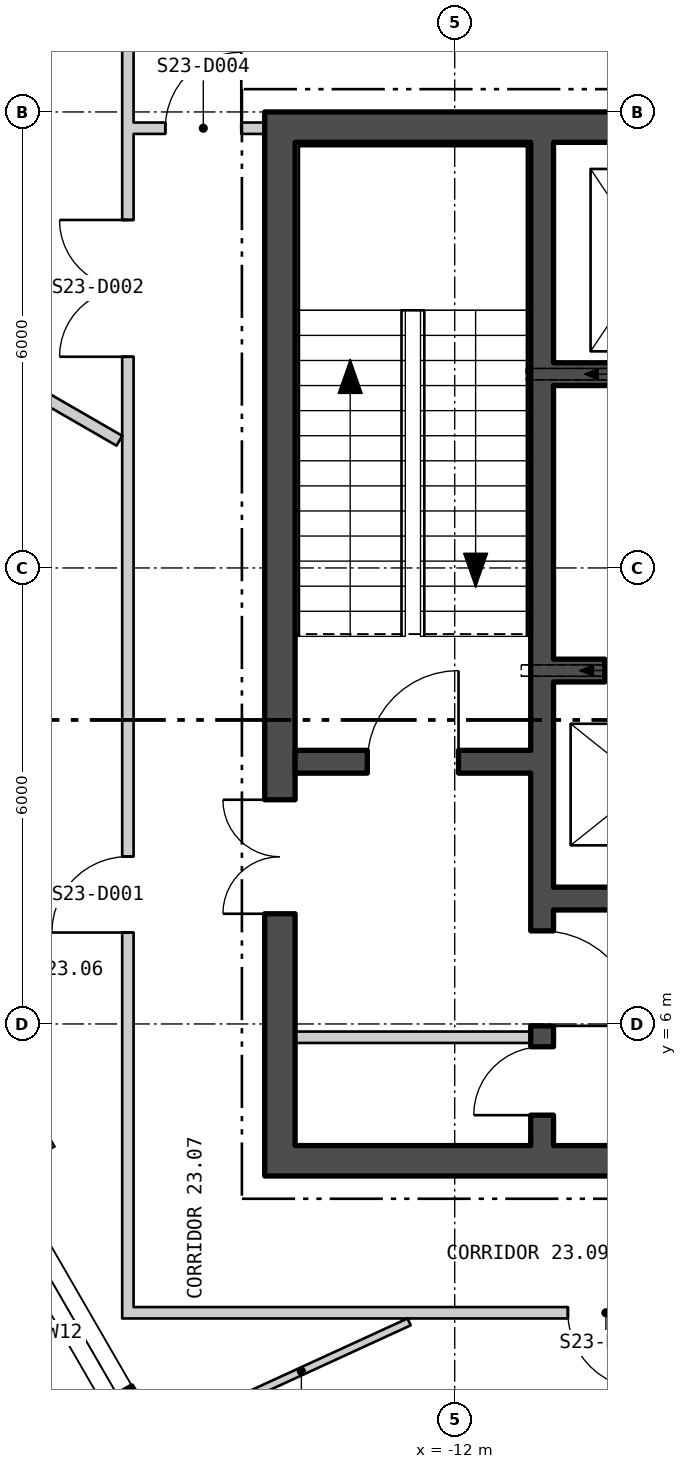
"""IFC4 building model, lengths in metres.
Left out: names, types, materials, properties, quantities, classifications, styles, units other than length and angle.
Written with IfcOpenShell. Run it as: python <this file> out.ifc"""

import sys

from ifc_helpers import new_model, si_unit, direction, frame, frame_2d, origin, origin_2d, place, context, subcontext, project, spatial, polyline, rectangle, hollow_rectangle, outline, extrude, element, fill, save


model = new_model("IFC4")
c1 = context("Model", 3, precision=1e-05, world=origin(), true_north=direction((0.0, 1.0)))
c2 = subcontext(c1, "Body", "Model", "MODEL_VIEW")
j1 = project(units=[si_unit("LENGTHUNIT", "METRE"), si_unit("PLANEANGLEUNIT", "RADIAN")], contexts=[c1])
p1 = place(None, origin())
s1 = spatial("IfcSite", under=j1, at=p1, CompositionType="ELEMENT")
p2 = place(p1, origin())
s2 = spatial("IfcBuilding", under=s1, at=p2, CompositionType="ELEMENT")
p3 = place(p2, frame((0.0, 0.0, 304.2)))
s3 = spatial("IfcBuildingStorey", under=s2, at=p3, CompositionType="ELEMENT", Elevation=304.2)
p4 = place(p3, frame((-17.671, 4.404, 0.0), z_axis=(0.0, 0.0, 1.0), x_axis=(0.5, -0.866025403784, 0.0)))
e1 = element("IfcColumn", 1, at=p4, inside=s3, PredefinedType="COLUMN", context=c2, shape_type="SweptSolid", body=[
    extrude(hollow_rectangle(XDim=0.45, YDim=0.7, WallThickness=0.04, at=origin_2d()), origin(), (0.0, 0.0, 1.0), 4.2),
])
p5 = place(p3, frame((-25.095, 16.112, -0.18), z_axis=(0.0, 0.0, 1.0), x_axis=(0.500000141277, -0.866025322218, 0.0)))
e2 = element("IfcWall", 2, at=p5, inside=s3, PredefinedType="SOLIDWALL", context=c2, shape_type="SweptSolid", body=[
    extrude(outline(polyline([(-0.13, -0.225), (45.86, -0.225), (45.6, 0.225), (0.13, 0.225), (-0.13, -0.225)])), origin(), (0.0, 0.0, 1.0), 3.98),
])
p6 = place(p5, frame((1.424, 0.0, 1.08)))
e3 = element("IfcOpeningElement", 3, at=p6, cuts=e2, PredefinedType="OPENING", context=c2, shape_type="SweptSolid", body=[
    extrude(rectangle(XDim=2.4, YDim=2.3, at=frame_2d((1.2, 1.15))), frame((0.0, 0.235, 0.0), z_axis=(0.0, -1.0, 0.0), x_axis=(1.0, 0.0, 0.0)), (0.0, 0.0, 1.0), 0.47),
])
p7 = place(p5, frame((5.892, 0.0, 1.08)))
e4 = element("IfcOpeningElement", 4, at=p7, cuts=e2, PredefinedType="OPENING", context=c2, shape_type="SweptSolid", body=[
    extrude(rectangle(XDim=2.4, YDim=2.3, at=frame_2d((1.2, 1.15))), frame((0.0, 0.235, 0.0), z_axis=(0.0, -1.0, 0.0), x_axis=(1.0, 0.0, 0.0)), (0.0, 0.0, 1.0), 0.47),
])
p8 = place(p5, frame((10.399, 0.0, 1.08)))
e5 = element("IfcOpeningElement", 5, at=p8, cuts=e2, PredefinedType="OPENING", context=c2, shape_type="SweptSolid", body=[
    extrude(rectangle(XDim=2.4, YDim=2.3, at=frame_2d((1.2, 1.15))), frame((0.0, 0.235, 0.0), z_axis=(0.0, -1.0, 0.0), x_axis=(1.0, 0.0, 0.0)), (0.0, 0.0, 1.0), 0.47),
])
p9 = place(p5, frame((14.905, 0.0, 1.08)))
e6 = element("IfcOpeningElement", 6, at=p9, cuts=e2, PredefinedType="OPENING", context=c2, shape_type="SweptSolid", body=[
    extrude(rectangle(XDim=2.4, YDim=2.3, at=frame_2d((1.2, 1.15))), frame((0.0, 0.235, 0.0), z_axis=(0.0, -1.0, 0.0), x_axis=(1.0, 0.0, 0.0)), (0.0, 0.0, 1.0), 0.47),
])
p10 = place(p5, frame((19.412, 0.0, 1.08)))
e7 = element("IfcOpeningElement", 7, at=p10, cuts=e2, PredefinedType="OPENING", context=c2, shape_type="SweptSolid", body=[
    extrude(rectangle(XDim=2.4, YDim=2.3, at=frame_2d((1.2, 1.15))), frame((0.0, 0.235, 0.0), z_axis=(0.0, -1.0, 0.0), x_axis=(1.0, 0.0, 0.0)), (0.0, 0.0, 1.0), 0.47),
])
p11 = place(p5, frame((28.425, 0.0, 1.08)))
e8 = element("IfcOpeningElement", 8, at=p11, cuts=e2, PredefinedType="OPENING", context=c2, shape_type="SweptSolid", body=[
    extrude(rectangle(XDim=2.4, YDim=2.3, at=frame_2d((1.2, 1.15))), frame((0.0, 0.235, 0.0), z_axis=(0.0, -1.0, 0.0), x_axis=(1.0, 0.0, 0.0)), (0.0, 0.0, 1.0), 0.47),
])
p12 = place(p5, frame((32.932, 0.0, 1.08)))
e9 = element("IfcOpeningElement", 9, at=p12, cuts=e2, PredefinedType="OPENING", context=c2, shape_type="SweptSolid", body=[
    extrude(rectangle(XDim=2.4, YDim=2.3, at=frame_2d((1.2, 1.15))), frame((0.0, 0.235, 0.0), z_axis=(0.0, -1.0, 0.0), x_axis=(1.0, 0.0, 0.0)), (0.0, 0.0, 1.0), 0.47),
])
p13 = place(p5, frame((37.438, 0.0, 1.08)))
e10 = element("IfcOpeningElement", 10, at=p13, cuts=e2, PredefinedType="OPENING", context=c2, shape_type="SweptSolid", body=[
    extrude(rectangle(XDim=2.4, YDim=2.3, at=frame_2d((1.2, 1.15))), frame((0.0, 0.235, 0.0), z_axis=(0.0, -1.0, 0.0), x_axis=(1.0, 0.0, 0.0)), (0.0, 0.0, 1.0), 0.47),
])
p14 = place(p5, frame((41.907, 0.0, 1.08)))
e11 = element("IfcOpeningElement", 11, at=p14, cuts=e2, PredefinedType="OPENING", context=c2, shape_type="SweptSolid", body=[
    extrude(rectangle(XDim=2.4, YDim=2.3, at=frame_2d((1.2, 1.15))), frame((0.0, 0.235, 0.0), z_axis=(0.0, -1.0, 0.0), x_axis=(1.0, 0.0, 0.0)), (0.0, 0.0, 1.0), 0.47),
])
p15 = place(p3, frame((-14.5, 4.2, 0.0), z_axis=(0.0, 0.0, 1.0), x_axis=(1.0, 0.0, 0.0)))
e12 = element("IfcWall", 12, at=p15, inside=s3, PredefinedType="SHEAR", context=c2, shape_type="SweptSolid", body=[
    extrude(rectangle(XDim=29.0, YDim=0.4, at=frame_2d((14.5, 0.0))), origin(), (0.0, 0.0, 1.0), 4.0),
])
p16 = place(p15, frame((9.0, 0.0, 0.0)))
e13 = element("IfcOpeningElement", 13, at=p16, cuts=e12, PredefinedType="OPENING", context=c2, shape_type="SweptSolid", body=[
    extrude(rectangle(XDim=1.8, YDim=2.4, at=frame_2d((0.9, 1.2))), frame((0.0, 0.21, 0.0), z_axis=(0.0, -1.0, 0.0), x_axis=(1.0, 0.0, 0.0)), (0.0, 0.0, 1.0), 0.42),
])
p17 = place(p15, frame((19.0, 0.0, 0.0)))
e14 = element("IfcOpeningElement", 14, at=p17, cuts=e12, PredefinedType="OPENING", context=c2, shape_type="SweptSolid", body=[
    extrude(rectangle(XDim=1.8, YDim=2.4, at=frame_2d((0.9, 1.2))), frame((0.0, 0.21, 0.0), z_axis=(0.0, -1.0, 0.0), x_axis=(1.0, 0.0, 0.0)), (0.0, 0.0, 1.0), 0.42),
])
p18 = place(p3, frame((-14.5, 17.8, 0.0), z_axis=(0.0, 0.0, 1.0), x_axis=(1.0, 0.0, 0.0)))
e15 = element("IfcWall", 15, at=p18, inside=s3, PredefinedType="SHEAR", context=c2, shape_type="SweptSolid", body=[
    extrude(rectangle(XDim=29.0, YDim=0.4, at=frame_2d((14.5, 0.0))), origin(), (0.0, 0.0, 1.0), 4.0),
])
p19 = place(p3, frame((-14.3, 4.4, 0.0), z_axis=(0.0, 0.0, 1.0), x_axis=(0.0, 1.0, 0.0)))
e16 = element("IfcWall", 16, at=p19, inside=s3, PredefinedType="SHEAR", context=c2, shape_type="SweptSolid", body=[
    extrude(rectangle(XDim=13.2, YDim=0.4, at=frame_2d((6.6, 0.0))), origin(), (0.0, 0.0, 1.0), 4.0),
])
p20 = place(p19, frame((3.05, 0.0, 0.0)))
e17 = element("IfcOpeningElement", 17, at=p20, cuts=e16, PredefinedType="OPENING", context=c2, shape_type="SweptSolid", body=[
    extrude(rectangle(XDim=1.5, YDim=2.1, at=frame_2d((0.75, 1.05))), frame((0.0, 0.21, 0.0), z_axis=(0.0, -1.0, 0.0), x_axis=(1.0, 0.0, 0.0)), (0.0, 0.0, 1.0), 0.42),
])
p21 = place(p3, frame((-10.85, 4.4, 0.0), z_axis=(0.0, 0.0, 1.0), x_axis=(0.0, 1.0, 0.0)))
e18 = element("IfcWall", 18, at=p21, inside=s3, PredefinedType="SHEAR", context=c2, shape_type="SweptSolid", body=[
    extrude(rectangle(XDim=13.2, YDim=0.3, at=frame_2d((6.6, 0.0))), origin(), (0.0, 0.0, 1.0), 4.0),
])
p22 = place(p21, frame((1.575, 0.0, 0.0)))
e19 = element("IfcOpeningElement", 19, at=p22, cuts=e18, PredefinedType="OPENING", context=c2, shape_type="SweptSolid", body=[
    extrude(rectangle(XDim=1.25, YDim=2.1, at=frame_2d((0.625, 1.05))), frame((0.0, 0.16, 0.0), z_axis=(0.0, -1.0, 0.0), x_axis=(1.0, 0.0, 0.0)), (0.0, 0.0, 1.0), 0.32),
])
p23 = place(p21, frame((0.4, 0.0, 0.0)))
e20 = element("IfcOpeningElement", 20, at=p23, cuts=e18, PredefinedType="OPENING", context=c2, shape_type="SweptSolid", body=[
    extrude(rectangle(XDim=0.9, YDim=2.1, at=frame_2d((0.45, 1.05))), frame((0.0, 0.16, 0.0), z_axis=(0.0, -1.0, 0.0), x_axis=(1.0, 0.0, 0.0)), (0.0, 0.0, 1.0), 0.32),
])
p24 = place(p3, frame((-14.1, 9.45, 0.0), z_axis=(0.0, 0.0, 1.0), x_axis=(1.0, 0.0, 0.0)))
e21 = element("IfcWall", 21, at=p24, inside=s3, PredefinedType="SHEAR", context=c2, shape_type="SweptSolid", body=[
    extrude(rectangle(XDim=3.1, YDim=0.3, at=frame_2d((1.55, 0.0))), origin(), (0.0, 0.0, 1.0), 4.0),
])
p25 = place(p24, frame((0.95, 0.0, 0.0)))
e22 = element("IfcOpeningElement", 22, at=p25, cuts=e21, PredefinedType="OPENING", context=c2, shape_type="SweptSolid", body=[
    extrude(rectangle(XDim=1.2, YDim=2.1, at=frame_2d((0.6, 1.05))), frame((0.0, 0.16, 0.0), z_axis=(0.0, -1.0, 0.0), x_axis=(1.0, 0.0, 0.0)), (0.0, 0.0, 1.0), 0.32),
])
p26 = place(p3, frame((-10.7, 14.55, 0.0), z_axis=(0.0, 0.0, 1.0), x_axis=(1.0, 0.0, 0.0)))
e23 = element("IfcWall", 23, at=p26, inside=s3, PredefinedType="SHEAR", context=c2, shape_type="SweptSolid", body=[
    extrude(rectangle(XDim=21.4, YDim=0.3, at=frame_2d((10.7, 0.0))), origin(), (0.0, 0.0, 1.0), 4.0),
])
p27 = place(p26, frame((0.738, 0.0, 0.0)))
e24 = element("IfcOpeningElement", 24, at=p27, cuts=e23, PredefinedType="OPENING", context=c2, shape_type="SweptSolid", body=[
    extrude(rectangle(XDim=1.1, YDim=2.1, at=frame_2d((0.55, 1.05))), frame((0.0, 0.16, 0.0), z_axis=(0.0, -1.0, 0.0), x_axis=(1.0, 0.0, 0.0)), (0.0, 0.0, 1.0), 0.32),
])
p28 = place(p26, frame((3.462, 0.0, 0.0)))
e25 = element("IfcOpeningElement", 25, at=p28, cuts=e23, PredefinedType="OPENING", context=c2, shape_type="SweptSolid", body=[
    extrude(rectangle(XDim=1.1, YDim=2.1, at=frame_2d((0.55, 1.05))), frame((0.0, 0.16, 0.0), z_axis=(0.0, -1.0, 0.0), x_axis=(1.0, 0.0, 0.0)), (0.0, 0.0, 1.0), 0.32),
])
p29 = place(p26, frame((6.138, 0.0, 0.0)))
e26 = element("IfcOpeningElement", 26, at=p29, cuts=e23, PredefinedType="OPENING", context=c2, shape_type="SweptSolid", body=[
    extrude(rectangle(XDim=1.1, YDim=2.1, at=frame_2d((0.55, 1.05))), frame((0.0, 0.16, 0.0), z_axis=(0.0, -1.0, 0.0), x_axis=(1.0, 0.0, 0.0)), (0.0, 0.0, 1.0), 0.32),
])
p30 = place(p26, frame((8.812, 0.0, 0.0)))
e27 = element("IfcOpeningElement", 27, at=p30, cuts=e23, PredefinedType="OPENING", context=c2, shape_type="SweptSolid", body=[
    extrude(rectangle(XDim=1.1, YDim=2.1, at=frame_2d((0.55, 1.05))), frame((0.0, 0.16, 0.0), z_axis=(0.0, -1.0, 0.0), x_axis=(1.0, 0.0, 0.0)), (0.0, 0.0, 1.0), 0.32),
])
p31 = place(p26, frame((19.562, 0.0, 0.0)))
e28 = element("IfcOpeningElement", 28, at=p31, cuts=e23, PredefinedType="OPENING", context=c2, shape_type="SweptSolid", body=[
    extrude(rectangle(XDim=1.1, YDim=2.1, at=frame_2d((0.55, 1.05))), frame((0.0, 0.16, 0.0), z_axis=(0.0, -1.0, 0.0), x_axis=(1.0, 0.0, 0.0)), (0.0, 0.0, 1.0), 0.32),
])
p32 = place(p26, frame((11.537, 0.0, 0.0)))
e29 = element("IfcOpeningElement", 29, at=p32, cuts=e23, PredefinedType="OPENING", context=c2, shape_type="SweptSolid", body=[
    extrude(rectangle(XDim=1.0, YDim=2.1, at=frame_2d((0.5, 1.05))), frame((0.0, 0.16, 0.0), z_axis=(0.0, -1.0, 0.0), x_axis=(1.0, 0.0, 0.0)), (0.0, 0.0, 1.0), 0.32),
])
p33 = place(p26, frame((14.213, 0.0, 0.0)))
e30 = element("IfcOpeningElement", 30, at=p33, cuts=e23, PredefinedType="OPENING", context=c2, shape_type="SweptSolid", body=[
    extrude(rectangle(XDim=1.0, YDim=2.1, at=frame_2d((0.5, 1.05))), frame((0.0, 0.16, 0.0), z_axis=(0.0, -1.0, 0.0), x_axis=(1.0, 0.0, 0.0)), (0.0, 0.0, 1.0), 0.32),
])
p34 = place(p26, frame((16.887, 0.0, 0.0)))
e31 = element("IfcOpeningElement", 31, at=p34, cuts=e23, PredefinedType="OPENING", context=c2, shape_type="SweptSolid", body=[
    extrude(rectangle(XDim=1.0, YDim=2.1, at=frame_2d((0.5, 1.05))), frame((0.0, 0.16, 0.0), z_axis=(0.0, -1.0, 0.0), x_axis=(1.0, 0.0, 0.0)), (0.0, 0.0, 1.0), 0.32),
])
p35 = place(p3, frame((-10.7, 10.65, 0.0), z_axis=(0.0, 0.0, 1.0), x_axis=(1.0, 0.0, 0.0)))
e32 = element("IfcWall", 32, at=p35, inside=s3, PredefinedType="SHEAR", context=c2, shape_type="SweptSolid", body=[
    extrude(rectangle(XDim=10.3, YDim=0.3, at=frame_2d((5.15, 0.0))), origin(), (0.0, 0.0, 1.0), 4.0),
])
p36 = place(p35, frame((0.675, 0.0, 0.0)))
e33 = element("IfcOpeningElement", 33, at=p36, cuts=e32, PredefinedType="OPENING", context=c2, shape_type="SweptSolid", body=[
    extrude(rectangle(XDim=1.1, YDim=2.1, at=frame_2d((0.55, 1.05))), frame((0.0, 0.16, 0.0), z_axis=(0.0, -1.0, 0.0), x_axis=(1.0, 0.0, 0.0)), (0.0, 0.0, 1.0), 0.32),
])
p37 = place(p35, frame((3.275, 0.0, 0.0)))
e34 = element("IfcOpeningElement", 34, at=p37, cuts=e32, PredefinedType="OPENING", context=c2, shape_type="SweptSolid", body=[
    extrude(rectangle(XDim=1.1, YDim=2.1, at=frame_2d((0.55, 1.05))), frame((0.0, 0.16, 0.0), z_axis=(0.0, -1.0, 0.0), x_axis=(1.0, 0.0, 0.0)), (0.0, 0.0, 1.0), 0.32),
])
p38 = place(p35, frame((5.825, 0.0, 0.0)))
e35 = element("IfcOpeningElement", 35, at=p38, cuts=e32, PredefinedType="OPENING", context=c2, shape_type="SweptSolid", body=[
    extrude(rectangle(XDim=1.1, YDim=2.1, at=frame_2d((0.55, 1.05))), frame((0.0, 0.16, 0.0), z_axis=(0.0, -1.0, 0.0), x_axis=(1.0, 0.0, 0.0)), (0.0, 0.0, 1.0), 0.32),
])
p39 = place(p35, frame((8.425, 0.0, 0.0)))
e36 = element("IfcOpeningElement", 36, at=p39, cuts=e32, PredefinedType="OPENING", context=c2, shape_type="SweptSolid", body=[
    extrude(rectangle(XDim=1.0, YDim=2.1, at=frame_2d((0.5, 1.05))), frame((0.0, 0.16, 0.0), z_axis=(0.0, -1.0, 0.0), x_axis=(1.0, 0.0, 0.0)), (0.0, 0.0, 1.0), 0.32),
])
p40 = place(p3, frame((-10.7, 7.65, 0.0), z_axis=(0.0, 0.0, 1.0), x_axis=(1.0, 0.0, 0.0)))
e37 = element("IfcWall", 37, at=p40, inside=s3, PredefinedType="SHEAR", context=c2, shape_type="SweptSolid", body=[
    extrude(rectangle(XDim=10.3, YDim=0.3, at=frame_2d((5.15, 0.0))), origin(), (0.0, 0.0, 1.0), 4.0),
])
p41 = place(p3, frame((-14.1, 5.825, 0.0), z_axis=(0.0, 0.0, 1.0), x_axis=(1.0, 0.0, 0.0)))
e38 = element("IfcWall", 38, at=p41, inside=s3, PredefinedType="PARTITIONING", context=c2, shape_type="SweptSolid", body=[
    extrude(rectangle(XDim=3.1, YDim=0.15, at=frame_2d((1.55, 0.0))), origin(), (0.0, 0.0, 1.0), 4.0),
])
p42 = place(p3, frame((-17.938, 14.555, 0.0), z_axis=(0.0, 0.0, 1.0), x_axis=(0.866034375916, -0.49998445949, 0.0)))
e39 = element("IfcWall", 39, at=p42, inside=s3, PredefinedType="PARTITIONING", context=c2, shape_type="SweptSolid", body=[
    extrude(rectangle(XDim=1.762, YDim=0.15, at=frame_2d((0.881, 0.0))), origin(), (0.0, 0.0, 1.0), 4.0),
])
p43 = place(p3, frame((-16.3, 2.125, 0.0), z_axis=(0.0, 0.0, 1.0), x_axis=(0.0, 1.0, 0.0)))
e40 = element("IfcWall", 40, at=p43, inside=s3, PredefinedType="PARTITIONING", context=c2, shape_type="SweptSolid", body=[
    extrude(rectangle(XDim=17.623, YDim=0.15, at=frame_2d((8.812, 0.0))), origin(), (0.0, 0.0, 1.0), 4.0),
])
p44 = place(p43, frame((5.078, 0.0, 0.0)))
e41 = element("IfcOpeningElement", 41, at=p44, cuts=e40, PredefinedType="OPENING", context=c2, shape_type="SweptSolid", body=[
    extrude(rectangle(XDim=1.0, YDim=2.1, at=frame_2d((0.5, 1.05))), frame((0.0, 0.085, 0.0), z_axis=(0.0, -1.0, 0.0), x_axis=(1.0, 0.0, 0.0)), (0.0, 0.0, 1.0), 0.17),
])
p45 = place(p43, frame((12.654, 0.0, 0.0)))
e42 = element("IfcOpeningElement", 42, at=p45, cuts=e40, PredefinedType="OPENING", context=c2, shape_type="SweptSolid", body=[
    extrude(rectangle(XDim=1.8, YDim=2.1, at=frame_2d((0.9, 1.05))), frame((0.0, 0.085, 0.0), z_axis=(0.0, -1.0, 0.0), x_axis=(1.0, 0.0, 0.0)), (0.0, 0.0, 1.0), 0.17),
])
p46 = place(p3, frame((-16.225, 2.2, 0.0), z_axis=(0.0, 0.0, 1.0), x_axis=(1.0, 0.0, 0.0)))
e43 = element("IfcWall", 43, at=p46, inside=s3, PredefinedType="PARTITIONING", context=c2, shape_type="SweptSolid", body=[
    extrude(rectangle(XDim=8.645, YDim=0.15, at=frame_2d((4.322, 0.0))), origin(), (0.0, 0.0, 1.0), 4.0),
])
p47 = place(p46, frame((5.714, 0.0, 0.0)))
e44 = element("IfcOpeningElement", 44, at=p47, cuts=e43, PredefinedType="OPENING", context=c2, shape_type="SweptSolid", body=[
    extrude(rectangle(XDim=1.0, YDim=2.1, at=frame_2d((0.5, 1.05))), frame((0.0, 0.085, 0.0), z_axis=(0.0, -1.0, 0.0), x_axis=(1.0, 0.0, 0.0)), (0.0, 0.0, 1.0), 0.17),
])
p48 = place(p3, frame((-16.225, 17.786, 0.0), z_axis=(0.0, 0.0, 1.0), x_axis=(1.0, 0.0, 0.0)))
e45 = element("IfcWall", 45, at=p48, inside=s3, PredefinedType="PARTITIONING", context=c2, shape_type="SweptSolid", body=[
    extrude(rectangle(XDim=1.725, YDim=0.15, at=frame_2d((0.863, 0.0))), origin(), (0.0, 0.0, 1.0), 4.0),
])
p49 = place(p48, frame((0.417, 0.0, 0.0)))
e46 = element("IfcOpeningElement", 46, at=p49, cuts=e45, PredefinedType="OPENING", context=c2, shape_type="SweptSolid", body=[
    extrude(rectangle(XDim=1.0, YDim=2.1, at=frame_2d((0.5, 1.05))), frame((0.0, 0.085, 0.0), z_axis=(0.0, -1.0, 0.0), x_axis=(1.0, 0.0, 0.0)), (0.0, 0.0, 1.0), 0.17),
])
p50 = place(p3, frame((-15.435, 0.779, 0.0), z_axis=(0.0, 0.0, 1.0), x_axis=(0.908867400556, 0.417085180996, 0.0)))
e47 = element("IfcWall", 47, at=p50, inside=s3, PredefinedType="PARTITIONING", context=c2, shape_type="SweptSolid", body=[
    extrude(rectangle(XDim=3.119, YDim=0.1, at=frame_2d((1.56, 0.0))), origin(), (0.0, 0.0, 1.0), 4.0),
])
p51 = place(p9, origin())
e48 = element("IfcWindow", 48, at=p51, inside=s3, PartitioningType="SINGLE_PANEL", PredefinedType="WINDOW", context=c2, shape_type="SweptSolid", body=[
    extrude(rectangle(XDim=2.4, YDim=2.3, at=frame_2d((1.2, 1.15))), frame((0.0, 0.105, 0.0), z_axis=(0.0, -1.0, 0.0), x_axis=(1.0, 0.0, 0.0)), (0.0, 0.0, 1.0), 0.06),
])
fill(e6, e48)
p52 = place(p36, origin())
e49 = element("IfcDoor", 49, at=p52, inside=s3, OperationType="SLIDING_TO_LEFT", PredefinedType="DOOR", context=c2, shape_type="SweptSolid", body=[
    extrude(rectangle(XDim=1.1, YDim=2.1, at=frame_2d((0.55, 1.05))), frame((0.0, 0.025, 0.0), z_axis=(0.0, -1.0, 0.0), x_axis=(1.0, 0.0, 0.0)), (0.0, 0.0, 1.0), 0.05),
])
fill(e33, e49)
p53 = place(p25, origin())
e50 = element("IfcDoor", 50, at=p53, inside=s3, OperationType="SINGLE_SWING_LEFT", PredefinedType="DOOR", context=c2, shape_type="SweptSolid", body=[
    extrude(rectangle(XDim=1.2, YDim=2.1, at=frame_2d((0.6, 1.05))), frame((0.0, 0.025, 0.0), z_axis=(0.0, -1.0, 0.0), x_axis=(1.0, 0.0, 0.0)), (0.0, 0.0, 1.0), 0.05),
])
fill(e22, e50)
p54 = place(p22, origin())
e51 = element("IfcDoor", 51, at=p54, inside=s3, OperationType="SINGLE_SWING_LEFT", PredefinedType="DOOR", context=c2, shape_type="SweptSolid", body=[
    extrude(rectangle(XDim=1.25, YDim=2.1, at=frame_2d((0.625, 1.05))), frame((0.0, 0.025, 0.0), z_axis=(0.0, -1.0, 0.0), x_axis=(1.0, 0.0, 0.0)), (0.0, 0.0, 1.0), 0.05),
])
fill(e19, e51)
p55 = place(p20, origin())
e52 = element("IfcDoor", 52, at=p55, inside=s3, OperationType="DOUBLE_DOOR_SINGLE_SWING", PredefinedType="DOOR", context=c2, shape_type="SweptSolid", body=[
    extrude(rectangle(XDim=1.5, YDim=2.1, at=frame_2d((0.75, 1.05))), frame((0.0, 0.025, 0.0), z_axis=(0.0, -1.0, 0.0), x_axis=(1.0, 0.0, 0.0)), (0.0, 0.0, 1.0), 0.05),
])
fill(e17, e52)
p56 = place(p23, origin())
e53 = element("IfcDoor", 53, at=p56, inside=s3, OperationType="SINGLE_SWING_RIGHT", PredefinedType="DOOR", context=c2, shape_type="SweptSolid", body=[
    extrude(rectangle(XDim=0.9, YDim=2.1, at=frame_2d((0.45, 1.05))), frame((0.0, 0.025, 0.0), z_axis=(0.0, -1.0, 0.0), x_axis=(1.0, 0.0, 0.0)), (0.0, 0.0, 1.0), 0.05),
])
fill(e20, e53)
p57 = place(p44, origin())
e54 = element("IfcDoor", 54, at=p57, inside=s3, OperationType="SINGLE_SWING_RIGHT", PredefinedType="DOOR", context=c2, shape_type="SweptSolid", body=[
    extrude(rectangle(XDim=1.0, YDim=2.1, at=frame_2d((0.5, 1.05))), frame((0.0, 0.025, 0.0), z_axis=(0.0, -1.0, 0.0), x_axis=(1.0, 0.0, 0.0)), (0.0, 0.0, 1.0), 0.05),
])
fill(e41, e54)
p58 = place(p45, origin())
e55 = element("IfcDoor", 55, at=p58, inside=s3, OperationType="DOUBLE_DOOR_SINGLE_SWING", PredefinedType="DOOR", context=c2, shape_type="SweptSolid", body=[
    extrude(rectangle(XDim=1.8, YDim=2.1, at=frame_2d((0.9, 1.05))), frame((0.0, 0.025, 0.0), z_axis=(0.0, -1.0, 0.0), x_axis=(1.0, 0.0, 0.0)), (0.0, 0.0, 1.0), 0.05),
])
fill(e42, e55)
p59 = place(p47, origin())
e56 = element("IfcDoor", 56, at=p59, inside=s3, OperationType="SINGLE_SWING_RIGHT", PredefinedType="DOOR", context=c2, shape_type="SweptSolid", body=[
    extrude(rectangle(XDim=1.0, YDim=2.1, at=frame_2d((0.5, 1.05))), frame((0.0, 0.025, 0.0), z_axis=(0.0, -1.0, 0.0), x_axis=(1.0, 0.0, 0.0)), (0.0, 0.0, 1.0), 0.05),
])
fill(e44, e56)
p60 = place(p49, origin())
e57 = element("IfcDoor", 57, at=p60, inside=s3, OperationType="SINGLE_SWING_LEFT", PredefinedType="DOOR", context=c2, shape_type="SweptSolid", body=[
    extrude(rectangle(XDim=1.0, YDim=2.1, at=frame_2d((0.5, 1.05))), frame((0.0, 0.025, 0.0), z_axis=(0.0, -1.0, 0.0), x_axis=(1.0, 0.0, 0.0)), (0.0, 0.0, 1.0), 0.05),
])
fill(e46, e57)
save(model, sys.argv[1])
